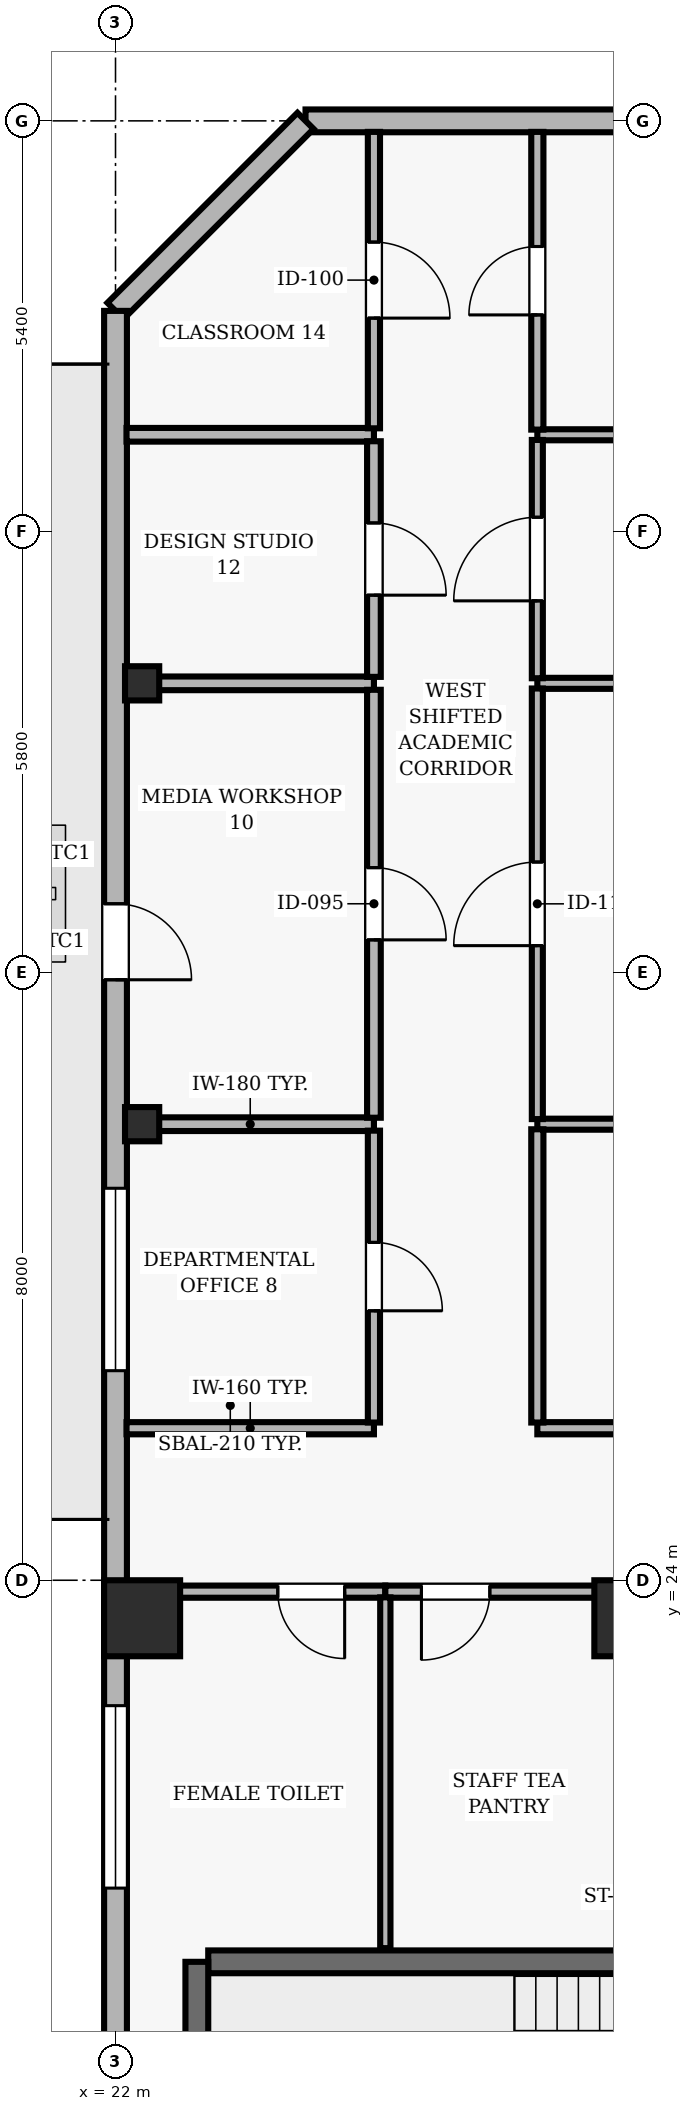
"""IFC4 building model, lengths in metres.
Left out: names, types, materials, properties, quantities, classifications, styles, units other than length and angle.
Written with IfcOpenShell. Run it as: python <this file> out.ifc"""

import sys

from ifc_helpers import new_model, si_unit, direction, frame, frame_2d, origin, origin_2d, place, context, subcontext, project, spatial, rectangle, hollow_rectangle, extrude, element, fill, save


model = new_model("IFC4")
c1 = context("Model", 3, precision=1e-05, world=origin(), true_north=direction((0.0, 1.0)))
c2 = subcontext(c1, "Body", "Model", "MODEL_VIEW")
j1 = project(units=[si_unit("LENGTHUNIT", "METRE"), si_unit("PLANEANGLEUNIT", "RADIAN")], contexts=[c1])
p1 = place(None, origin())
s1 = spatial("IfcSite", under=j1, at=p1, CompositionType="ELEMENT")
p2 = place(p1, origin())
s2 = spatial("IfcBuilding", under=s1, at=p2, CompositionType="ELEMENT")
p3 = place(p2, frame((0.0, 0.0, 226.5)))
s3 = spatial("IfcBuildingStorey", under=s2, at=p3, CompositionType="ELEMENT", Elevation=226.5)
for number, where, z_axis, x_axis in (
    (1, (22.35, 23.5, 0.0), (0.0, 0.0, 1.0), (1.0, 0.0, 0.0)),
    (2, (28.8, 23.5, 0.0), (0.0, 0.0, 1.0), (1.0, 0.0, 0.0)),
):
    element("IfcColumn", number, at=place(p3, frame(where, z_axis=z_axis, x_axis=x_axis)), inside=s3, PredefinedType="COLUMN", context=c2, shape_type="SweptSolid", body=[
        extrude(rectangle(XDim=1.0, YDim=1.0, at=origin_2d()), origin(), (0.0, 0.0, 1.0), 3.9),
    ])
for number, where, z_axis, x_axis in (
    (3, (22.35, 30.0, 0.0), (0.0, 0.0, 1.0), (1.0, 0.0, 0.0)),
    (4, (22.35, 35.8, 0.0), (0.0, 0.0, 1.0), (1.0, 0.0, 0.0)),
):
    element("IfcColumn", number, at=place(p3, frame(where, z_axis=z_axis, x_axis=x_axis)), inside=s3, PredefinedType="COLUMN", context=c2, shape_type="SweptSolid", body=[
        extrude(hollow_rectangle(XDim=0.45, YDim=0.45, WallThickness=0.02, at=origin_2d()), origin(), (0.0, 0.0, 1.0), 3.9),
    ])
p4 = place(p3, frame((35.5, 43.2, 0.0), z_axis=(0.0, 0.0, 1.0), x_axis=(-1.0, 0.0, 0.0)))
e5 = element("IfcWall", 5, at=p4, inside=s3, PredefinedType="SOLIDWALL", context=c2, shape_type="SweptSolid", body=[
    extrude(rectangle(XDim=11.0, YDim=0.3, at=frame_2d((5.5, 0.0))), origin(), (0.0, 0.0, 1.0), 3.69),
])
p5 = place(p4, frame((2.0, 0.0, 0.9)))
e6 = element("IfcOpeningElement", 6, at=p5, cuts=e5, PredefinedType="OPENING", context=c2, shape_type="SweptSolid", body=[
    extrude(rectangle(XDim=1.5, YDim=1.8, at=frame_2d((0.75, 0.9))), frame((0.0, 0.16, 0.0), z_axis=(0.0, -1.0, 0.0), x_axis=(1.0, 0.0, 0.0)), (0.0, 0.0, 1.0), 0.32),
])
p6 = place(p3, frame((24.5, 43.2, 0.0), z_axis=(0.0, 0.0, 1.0), x_axis=(-0.707106781187, -0.707106781187, 0.0)))
e7 = element("IfcWall", 7, at=p6, inside=s3, PredefinedType="SOLIDWALL", context=c2, shape_type="SweptSolid", body=[
    extrude(rectangle(XDim=3.536, YDim=0.3, at=frame_2d((1.768, 0.0))), origin(), (0.0, 0.0, 1.0), 3.69),
])
p7 = place(p3, frame((22.0, 40.7, 0.0), z_axis=(0.0, 0.0, 1.0), x_axis=(0.0, -1.0, 0.0)))
e8 = element("IfcWall", 8, at=p7, inside=s3, PredefinedType="SOLIDWALL", context=c2, shape_type="SweptSolid", body=[
    extrude(rectangle(XDim=38.2, YDim=0.3, at=frame_2d((19.1, 0.0))), origin(), (0.0, 0.0, 1.0), 3.69),
])
p8 = place(p7, frame((7.8, 0.0, 0.0)))
e9 = element("IfcOpeningElement", 9, at=p8, cuts=e8, PredefinedType="OPENING", context=c2, shape_type="SweptSolid", body=[
    extrude(rectangle(XDim=1.0, YDim=2.2, at=frame_2d((0.5, 1.1))), frame((0.0, 0.16, 0.0), z_axis=(0.0, -1.0, 0.0), x_axis=(1.0, 0.0, 0.0)), (0.0, 0.0, 1.0), 0.32),
])
p9 = place(p7, frame((11.543, 0.0, 0.9)))
e10 = element("IfcOpeningElement", 10, at=p9, cuts=e8, PredefinedType="OPENING", context=c2, shape_type="SweptSolid", body=[
    extrude(rectangle(XDim=2.4, YDim=1.8, at=frame_2d((1.2, 0.9))), frame((0.0, 0.16, 0.0), z_axis=(0.0, -1.0, 0.0), x_axis=(1.0, 0.0, 0.0)), (0.0, 0.0, 1.0), 0.32),
])
p10 = place(p7, frame((18.35, 0.0, 0.9)))
e11 = element("IfcOpeningElement", 11, at=p10, cuts=e8, PredefinedType="OPENING", context=c2, shape_type="SweptSolid", body=[
    extrude(rectangle(XDim=2.4, YDim=1.8, at=frame_2d((1.2, 0.9))), frame((0.0, 0.16, 0.0), z_axis=(0.0, -1.0, 0.0), x_axis=(1.0, 0.0, 0.0)), (0.0, 0.0, 1.0), 0.32),
])
p11 = place(p7, frame((22.907, 0.0, 0.9)))
e12 = element("IfcOpeningElement", 12, at=p11, cuts=e8, PredefinedType="OPENING", context=c2, shape_type="SweptSolid", body=[
    extrude(rectangle(XDim=2.4, YDim=1.8, at=frame_2d((1.2, 0.9))), frame((0.0, 0.16, 0.0), z_axis=(0.0, -1.0, 0.0), x_axis=(1.0, 0.0, 0.0)), (0.0, 0.0, 1.0), 0.32),
])
p12 = place(p7, frame((28.814, 0.0, 0.9)))
e13 = element("IfcOpeningElement", 13, at=p12, cuts=e8, PredefinedType="OPENING", context=c2, shape_type="SweptSolid", body=[
    extrude(rectangle(XDim=2.4, YDim=1.8, at=frame_2d((1.2, 0.9))), frame((0.0, 0.16, 0.0), z_axis=(0.0, -1.0, 0.0), x_axis=(1.0, 0.0, 0.0)), (0.0, 0.0, 1.0), 0.32),
])
p13 = place(p3, frame((31.58, 18.98, 0.0), z_axis=(0.0, 0.0, 1.0), x_axis=(-1.0, 0.0, 0.0)))
e14 = element("IfcWall", 14, at=p13, inside=s3, PredefinedType="SHEAR", context=c2, shape_type="SweptSolid", body=[
    extrude(rectangle(XDim=8.36, YDim=0.3, at=frame_2d((4.18, 0.0))), origin(), (0.0, 0.0, 1.0), 3.69),
])
p14 = place(p3, frame((23.07, 18.98, 0.0), z_axis=(0.0, 0.0, 1.0), x_axis=(0.0, -1.0, 0.0)))
e15 = element("IfcWall", 15, at=p14, inside=s3, PredefinedType="SHEAR", context=c2, shape_type="SweptSolid", body=[
    extrude(rectangle(XDim=3.51, YDim=0.3, at=frame_2d((1.755, 0.0))), origin(), (0.0, 0.0, 1.0), 3.69),
])
p15 = place(p3, frame((25.4, 26.0, 0.0), z_axis=(0.0, 0.0, 1.0), x_axis=(-1.0, 0.0, 0.0)))
e16 = element("IfcWall", 16, at=p15, inside=s3, PredefinedType="PARTITIONING", context=c2, shape_type="SweptSolid", body=[
    extrude(rectangle(XDim=3.255, YDim=0.16, at=frame_2d((1.627, 0.0))), origin(), (0.0, 0.0, 1.0), 3.69),
])
for number, where, z_axis, x_axis in (
    (17, (25.4, 30.0, 0.0), (0.0, 0.0, 1.0), (-1.0, 0.0, 0.0)),
    (18, (25.4, 35.8, 0.0), (0.0, 0.0, 1.0), (-1.0, 0.0, 0.0)),
):
    element("IfcWall", number, at=place(p3, frame(where, z_axis=z_axis, x_axis=x_axis)), inside=s3, PredefinedType="PARTITIONING", context=c2, shape_type="SweptSolid", body=[
        extrude(rectangle(XDim=3.255, YDim=0.18, at=frame_2d((1.627, 0.0))), origin(), (0.0, 0.0, 1.0), 3.146),
    ])
p16 = place(p3, frame((25.4, 39.07, 0.0), z_axis=(0.0, 0.0, 1.0), x_axis=(-1.0, 0.0, 0.0)))
e19 = element("IfcWall", 19, at=p16, inside=s3, PredefinedType="PARTITIONING", context=c2, shape_type="SweptSolid", body=[
    extrude(rectangle(XDim=3.255, YDim=0.18, at=frame_2d((1.627, 0.0))), origin(), (0.0, 0.0, 1.0), 3.69),
])
p17 = place(p3, frame((25.55, 23.85, 0.0), z_axis=(0.0, 0.0, 1.0), x_axis=(-1.0, 0.0, 0.0)))
e20 = element("IfcWall", 20, at=p17, inside=s3, PredefinedType="PARTITIONING", context=c2, shape_type="SweptSolid", body=[
    extrude(rectangle(XDim=3.35, YDim=0.16, at=frame_2d((1.675, 0.0))), origin(), (0.0, 0.0, 1.0), 3.146),
])
p18 = place(p17, frame((0.535, 0.0, 0.0)))
e21 = element("IfcOpeningElement", 21, at=p18, cuts=e20, PredefinedType="OPENING", context=c2, shape_type="SweptSolid", body=[
    extrude(rectangle(XDim=0.88, YDim=2.1, at=frame_2d((0.44, 1.05))), frame((0.0, 0.09, 0.0), z_axis=(0.0, -1.0, 0.0), x_axis=(1.0, 0.0, 0.0)), (0.0, 0.0, 1.0), 0.18),
])
p19 = place(p3, frame((28.8, 23.85, 0.0), z_axis=(0.0, 0.0, 1.0), x_axis=(-1.0, 0.0, 0.0)))
e22 = element("IfcWall", 22, at=p19, inside=s3, PredefinedType="PARTITIONING", context=c2, shape_type="SweptSolid", body=[
    extrude(rectangle(XDim=3.25, YDim=0.16, at=frame_2d((1.625, 0.0))), origin(), (0.0, 0.0, 1.0), 3.146),
])
p20 = place(p19, frame((1.875, 0.0, 0.0)))
e23 = element("IfcOpeningElement", 23, at=p20, cuts=e22, PredefinedType="OPENING", context=c2, shape_type="SweptSolid", body=[
    extrude(rectangle(XDim=0.9, YDim=2.1, at=frame_2d((0.45, 1.05))), frame((0.0, 0.09, 0.0), z_axis=(0.0, -1.0, 0.0), x_axis=(1.0, 0.0, 0.0)), (0.0, 0.0, 1.0), 0.18),
])
p21 = place(p3, frame((37.85, 26.0, 0.0), z_axis=(0.0, 0.0, 1.0), x_axis=(-1.0, 0.0, 0.0)))
e24 = element("IfcWall", 24, at=p21, inside=s3, PredefinedType="PARTITIONING", context=c2, shape_type="SweptSolid", body=[
    extrude(rectangle(XDim=10.3, YDim=0.16, at=frame_2d((5.15, 0.0))), origin(), (0.0, 0.0, 1.0), 3.69),
])
p22 = place(p21, frame((4.7, 0.0, 0.0)))
e25 = element("IfcOpeningElement", 25, at=p22, cuts=e24, PredefinedType="OPENING", context=c2, shape_type="SweptSolid", body=[
    extrude(rectangle(XDim=0.9, YDim=2.1, at=frame_2d((0.45, 1.05))), frame((0.0, 0.09, 0.0), z_axis=(0.0, -1.0, 0.0), x_axis=(1.0, 0.0, 0.0)), (0.0, 0.0, 1.0), 0.18),
])
for number, where, z_axis, x_axis in (
    (26, (37.85, 30.0, 0.0), (0.0, 0.0, 1.0), (-1.0, 0.0, 0.0)),
    (27, (37.85, 35.8, 0.0), (0.0, 0.0, 1.0), (-1.0, 0.0, 0.0)),
):
    element("IfcWall", number, at=place(p3, frame(where, z_axis=z_axis, x_axis=x_axis)), inside=s3, PredefinedType="PARTITIONING", context=c2, shape_type="SweptSolid", body=[
        extrude(rectangle(XDim=10.3, YDim=0.145, at=frame_2d((5.15, 0.0))), origin(), (0.0, 0.0, 1.0), 3.146),
    ])
p23 = place(p3, frame((37.85, 39.07, 0.0), z_axis=(0.0, 0.0, 1.0), x_axis=(-1.0, 0.0, 0.0)))
e28 = element("IfcWall", 28, at=p23, inside=s3, PredefinedType="PARTITIONING", context=c2, shape_type="SweptSolid", body=[
    extrude(rectangle(XDim=10.3, YDim=0.145, at=frame_2d((5.15, 0.0))), origin(), (0.0, 0.0, 1.0), 3.69),
])
p24 = place(p3, frame((25.4, 29.915, 0.0), z_axis=(0.0, 0.0, 1.0), x_axis=(0.0, -1.0, 0.0)))
e29 = element("IfcWall", 29, at=p24, inside=s3, PredefinedType="PARTITIONING", context=c2, shape_type="SweptSolid", body=[
    extrude(rectangle(XDim=3.84, YDim=0.16, at=frame_2d((1.92, 0.0))), origin(), (0.0, 0.0, 1.0), 3.69),
])
p25 = place(p24, frame((1.47, 0.0, 0.0)))
e30 = element("IfcOpeningElement", 30, at=p25, cuts=e29, PredefinedType="OPENING", context=c2, shape_type="SweptSolid", body=[
    extrude(rectangle(XDim=0.9, YDim=2.1, at=frame_2d((0.45, 1.05))), frame((0.0, 0.09, 0.0), z_axis=(0.0, -1.0, 0.0), x_axis=(1.0, 0.0, 0.0)), (0.0, 0.0, 1.0), 0.18),
])
p26 = place(p3, frame((25.4, 35.715, 0.0), z_axis=(0.0, 0.0, 1.0), x_axis=(0.0, -1.0, 0.0)))
e31 = element("IfcWall", 31, at=p26, inside=s3, PredefinedType="PARTITIONING", context=c2, shape_type="SweptSolid", body=[
    extrude(rectangle(XDim=5.63, YDim=0.18, at=frame_2d((2.815, 0.0))), origin(), (0.0, 0.0, 1.0), 3.69),
])
p27 = place(p26, frame((2.34, 0.0, 0.0)))
e32 = element("IfcOpeningElement", 32, at=p27, cuts=e31, PredefinedType="OPENING", context=c2, shape_type="SweptSolid", body=[
    extrude(rectangle(XDim=0.95, YDim=2.1, at=frame_2d((0.475, 1.05))), frame((0.0, 0.1, 0.0), z_axis=(0.0, -1.0, 0.0), x_axis=(1.0, 0.0, 0.0)), (0.0, 0.0, 1.0), 0.2),
])
p28 = place(p3, frame((25.4, 38.985, 0.0), z_axis=(0.0, 0.0, 1.0), x_axis=(0.0, -1.0, 0.0)))
e33 = element("IfcWall", 33, at=p28, inside=s3, PredefinedType="PARTITIONING", context=c2, shape_type="SweptSolid", body=[
    extrude(rectangle(XDim=3.1, YDim=0.18, at=frame_2d((1.55, 0.0))), origin(), (0.0, 0.0, 1.0), 3.69),
])
p29 = place(p28, frame((1.075, 0.0, 0.0)))
e34 = element("IfcOpeningElement", 34, at=p29, cuts=e33, PredefinedType="OPENING", context=c2, shape_type="SweptSolid", body=[
    extrude(rectangle(XDim=0.95, YDim=2.1, at=frame_2d((0.475, 1.05))), frame((0.0, 0.1, 0.0), z_axis=(0.0, -1.0, 0.0), x_axis=(1.0, 0.0, 0.0)), (0.0, 0.0, 1.0), 0.2),
])
p30 = place(p3, frame((25.4, 43.055, 0.0), z_axis=(0.0, 0.0, 1.0), x_axis=(0.0, -1.0, 0.0)))
e35 = element("IfcWall", 35, at=p30, inside=s3, PredefinedType="PARTITIONING", context=c2, shape_type="SweptSolid", body=[
    extrude(rectangle(XDim=3.9, YDim=0.16, at=frame_2d((1.95, 0.0))), origin(), (0.0, 0.0, 1.0), 3.69),
])
p31 = place(p30, frame((1.45, 0.0, 0.0)))
e36 = element("IfcOpeningElement", 36, at=p31, cuts=e35, PredefinedType="OPENING", context=c2, shape_type="SweptSolid", body=[
    extrude(rectangle(XDim=1.0, YDim=2.1, at=frame_2d((0.5, 1.05))), frame((0.0, 0.09, 0.0), z_axis=(0.0, -1.0, 0.0), x_axis=(1.0, 0.0, 0.0)), (0.0, 0.0, 1.0), 0.18),
])
p32 = place(p3, frame((25.55, 19.16, 0.0), z_axis=(0.0, 0.0, 1.0), x_axis=(0.0, 1.0, 0.0)))
e37 = element("IfcWall", 37, at=p32, inside=s3, PredefinedType="PARTITIONING", context=c2, shape_type="SweptSolid", body=[
    extrude(rectangle(XDim=4.615, YDim=0.135, at=frame_2d((2.308, 0.0))), origin(), (0.0, 0.0, 1.0), 3.69),
])
p33 = place(p3, frame((27.55, 26.075, 0.0), z_axis=(0.0, 0.0, 1.0), x_axis=(0.0, 1.0, 0.0)))
e38 = element("IfcWall", 38, at=p33, inside=s3, PredefinedType="PARTITIONING", context=c2, shape_type="SweptSolid", body=[
    extrude(rectangle(XDim=3.858, YDim=0.16, at=frame_2d((1.929, 0.0))), origin(), (0.0, 0.0, 1.0), 3.69),
])
p34 = place(p3, frame((27.55, 30.067, 0.0), z_axis=(0.0, 0.0, 1.0), x_axis=(0.0, 1.0, 0.0)))
e39 = element("IfcWall", 39, at=p34, inside=s3, PredefinedType="PARTITIONING", context=c2, shape_type="SweptSolid", body=[
    extrude(rectangle(XDim=5.665, YDim=0.145, at=frame_2d((2.833, 0.0))), origin(), (0.0, 0.0, 1.0), 3.69),
])
p35 = place(p34, frame((2.282, 0.0, 0.0)))
e40 = element("IfcOpeningElement", 40, at=p35, cuts=e39, PredefinedType="OPENING", context=c2, shape_type="SweptSolid", body=[
    extrude(rectangle(XDim=1.1, YDim=2.15, at=frame_2d((0.55, 1.075))), frame((0.0, 0.083, 0.0), z_axis=(0.0, -1.0, 0.0), x_axis=(1.0, 0.0, 0.0)), (0.0, 0.0, 1.0), 0.165),
])
p36 = place(p3, frame((27.55, 35.867, 0.0), z_axis=(0.0, 0.0, 1.0), x_axis=(0.0, 1.0, 0.0)))
e41 = element("IfcWall", 41, at=p36, inside=s3, PredefinedType="PARTITIONING", context=c2, shape_type="SweptSolid", body=[
    extrude(rectangle(XDim=3.135, YDim=0.145, at=frame_2d((1.567, 0.0))), origin(), (0.0, 0.0, 1.0), 3.69),
])
p37 = place(p36, frame((1.018, 0.0, 0.0)))
e42 = element("IfcOpeningElement", 42, at=p37, cuts=e41, PredefinedType="OPENING", context=c2, shape_type="SweptSolid", body=[
    extrude(rectangle(XDim=1.1, YDim=2.15, at=frame_2d((0.55, 1.075))), frame((0.0, 0.083, 0.0), z_axis=(0.0, -1.0, 0.0), x_axis=(1.0, 0.0, 0.0)), (0.0, 0.0, 1.0), 0.165),
])
p38 = place(p3, frame((27.55, 39.138, 0.0), z_axis=(0.0, 0.0, 1.0), x_axis=(0.0, 1.0, 0.0)))
e43 = element("IfcWall", 43, at=p38, inside=s3, PredefinedType="PARTITIONING", context=c2, shape_type="SweptSolid", body=[
    extrude(rectangle(XDim=3.917, YDim=0.16, at=frame_2d((1.958, 0.0))), origin(), (0.0, 0.0, 1.0), 3.69),
])
p39 = place(p38, frame((1.509, 0.0, 0.0)))
e44 = element("IfcOpeningElement", 44, at=p39, cuts=e43, PredefinedType="OPENING", context=c2, shape_type="SweptSolid", body=[
    extrude(rectangle(XDim=0.9, YDim=2.1, at=frame_2d((0.45, 1.05))), frame((0.0, 0.09, 0.0), z_axis=(0.0, -1.0, 0.0), x_axis=(1.0, 0.0, 0.0)), (0.0, 0.0, 1.0), 0.18),
])
p40 = place(p8, origin())
e45 = element("IfcDoor", 45, at=p40, inside=s3, OperationType="SINGLE_SWING_RIGHT", PredefinedType="DOOR", context=c2, shape_type="SweptSolid", body=[
    extrude(rectangle(XDim=1.0, YDim=2.2, at=frame_2d((0.5, 1.1))), frame((0.0, 0.025, 0.0), z_axis=(0.0, -1.0, 0.0), x_axis=(1.0, 0.0, 0.0)), (0.0, 0.0, 1.0), 0.05),
])
fill(e9, e45)
p41 = place(p9, origin())
e46 = element("IfcWindow", 46, at=p41, inside=s3, PartitioningType="SINGLE_PANEL", PredefinedType="WINDOW", context=c2, shape_type="SweptSolid", body=[
    extrude(rectangle(XDim=2.4, YDim=1.8, at=frame_2d((1.2, 0.9))), frame((0.0, 0.03, 0.0), z_axis=(0.0, -1.0, 0.0), x_axis=(1.0, 0.0, 0.0)), (0.0, 0.0, 1.0), 0.06),
])
fill(e10, e46)
p42 = place(p10, origin())
e47 = element("IfcWindow", 47, at=p42, inside=s3, PartitioningType="SINGLE_PANEL", PredefinedType="WINDOW", context=c2, shape_type="SweptSolid", body=[
    extrude(rectangle(XDim=2.4, YDim=1.8, at=frame_2d((1.2, 0.9))), frame((0.0, 0.03, 0.0), z_axis=(0.0, -1.0, 0.0), x_axis=(1.0, 0.0, 0.0)), (0.0, 0.0, 1.0), 0.06),
])
fill(e11, e47)
p43 = place(p18, origin())
e48 = element("IfcDoor", 48, at=p43, inside=s3, OperationType="SINGLE_SWING_LEFT", PredefinedType="DOOR", context=c2, shape_type="SweptSolid", body=[
    extrude(rectangle(XDim=0.88, YDim=2.1, at=frame_2d((0.44, 1.05))), frame((0.0, 0.025, 0.0), z_axis=(0.0, -1.0, 0.0), x_axis=(1.0, 0.0, 0.0)), (0.0, 0.0, 1.0), 0.05),
])
fill(e21, e48)
p44 = place(p20, origin())
e49 = element("IfcDoor", 49, at=p44, inside=s3, OperationType="SINGLE_SWING_RIGHT", PredefinedType="DOOR", context=c2, shape_type="SweptSolid", body=[
    extrude(rectangle(XDim=0.9, YDim=2.1, at=frame_2d((0.45, 1.05))), frame((0.0, 0.025, 0.0), z_axis=(0.0, -1.0, 0.0), x_axis=(1.0, 0.0, 0.0)), (0.0, 0.0, 1.0), 0.05),
])
fill(e23, e49)
p45 = place(p25, origin())
e50 = element("IfcDoor", 50, at=p45, inside=s3, OperationType="SINGLE_SWING_RIGHT", PredefinedType="DOOR", context=c2, shape_type="SweptSolid", body=[
    extrude(rectangle(XDim=0.9, YDim=2.1, at=frame_2d((0.45, 1.05))), frame((0.0, 0.025, 0.0), z_axis=(0.0, -1.0, 0.0), x_axis=(1.0, 0.0, 0.0)), (0.0, 0.0, 1.0), 0.05),
])
fill(e30, e50)
p46 = place(p27, origin())
e51 = element("IfcDoor", 51, at=p46, inside=s3, OperationType="SINGLE_SWING_RIGHT", PredefinedType="DOOR", context=c2, shape_type="SweptSolid", body=[
    extrude(rectangle(XDim=0.95, YDim=2.1, at=frame_2d((0.475, 1.05))), frame((0.0, 0.025, 0.0), z_axis=(0.0, -1.0, 0.0), x_axis=(1.0, 0.0, 0.0)), (0.0, 0.0, 1.0), 0.05),
])
fill(e32, e51)
p47 = place(p35, origin())
e52 = element("IfcDoor", 52, at=p47, inside=s3, OperationType="SINGLE_SWING_LEFT", PredefinedType="DOOR", context=c2, shape_type="SweptSolid", body=[
    extrude(rectangle(XDim=1.1, YDim=2.15, at=frame_2d((0.55, 1.075))), frame((0.0, 0.025, 0.0), z_axis=(0.0, -1.0, 0.0), x_axis=(1.0, 0.0, 0.0)), (0.0, 0.0, 1.0), 0.05),
])
fill(e40, e52)
p48 = place(p29, origin())
e53 = element("IfcDoor", 53, at=p48, inside=s3, OperationType="SINGLE_SWING_RIGHT", PredefinedType="DOOR", context=c2, shape_type="SweptSolid", body=[
    extrude(rectangle(XDim=0.95, YDim=2.1, at=frame_2d((0.475, 1.05))), frame((0.0, 0.025, 0.0), z_axis=(0.0, -1.0, 0.0), x_axis=(1.0, 0.0, 0.0)), (0.0, 0.0, 1.0), 0.05),
])
fill(e34, e53)
p49 = place(p37, origin())
e54 = element("IfcDoor", 54, at=p49, inside=s3, OperationType="SINGLE_SWING_LEFT", PredefinedType="DOOR", context=c2, shape_type="SweptSolid", body=[
    extrude(rectangle(XDim=1.1, YDim=2.15, at=frame_2d((0.55, 1.075))), frame((0.0, 0.025, 0.0), z_axis=(0.0, -1.0, 0.0), x_axis=(1.0, 0.0, 0.0)), (0.0, 0.0, 1.0), 0.05),
])
fill(e42, e54)
p50 = place(p31, origin())
e55 = element("IfcDoor", 55, at=p50, inside=s3, OperationType="SINGLE_SWING_RIGHT", PredefinedType="DOOR", context=c2, shape_type="SweptSolid", body=[
    extrude(rectangle(XDim=1.0, YDim=2.1, at=frame_2d((0.5, 1.05))), frame((0.0, 0.025, 0.0), z_axis=(0.0, -1.0, 0.0), x_axis=(1.0, 0.0, 0.0)), (0.0, 0.0, 1.0), 0.05),
])
fill(e36, e55)
p51 = place(p39, origin())
e56 = element("IfcDoor", 56, at=p51, inside=s3, OperationType="SINGLE_SWING_LEFT", PredefinedType="DOOR", context=c2, shape_type="SweptSolid", body=[
    extrude(rectangle(XDim=0.9, YDim=2.1, at=frame_2d((0.45, 1.05))), frame((0.0, 0.025, 0.0), z_axis=(0.0, -1.0, 0.0), x_axis=(1.0, 0.0, 0.0)), (0.0, 0.0, 1.0), 0.05),
])
fill(e44, e56)
save(model, sys.argv[1])
